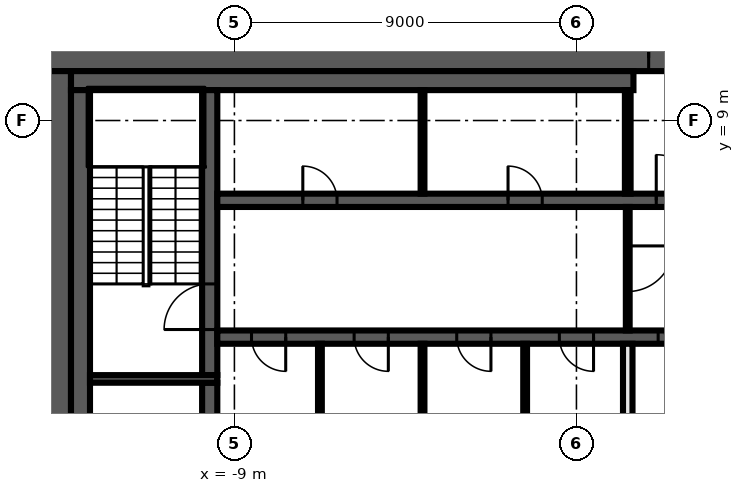
"""IFC4 building model, lengths in metres.
Left out: names, types, materials, properties, quantities, classifications, styles, units other than length and angle.
Written with IfcOpenShell. Run it as: python <this file> out.ifc"""

import sys

from ifc_helpers import new_model, si_unit, direction, frame, frame_2d, origin, place, context, subcontext, project, spatial, rectangle, extrude, element, fill, save


model = new_model("IFC4")
c1 = context("Model", 3, precision=1e-05, world=origin(), true_north=direction((0.0, 1.0)))
c2 = subcontext(c1, "Body", "Model", "MODEL_VIEW")
j1 = project(units=[si_unit("LENGTHUNIT", "METRE"), si_unit("PLANEANGLEUNIT", "RADIAN")], contexts=[c1])
p1 = place(None, origin())
s1 = spatial("IfcSite", under=j1, at=p1, CompositionType="ELEMENT")
p2 = place(p1, origin())
s2 = spatial("IfcBuilding", under=s1, at=p2, CompositionType="ELEMENT")
p3 = place(p2, frame((0.0, 0.0, 274.8)))
s3 = spatial("IfcBuildingStorey", under=s2, at=p3, CompositionType="ELEMENT", Elevation=274.8)
p4 = place(p3, frame((-14.0, 10.65, 0.0), z_axis=(0.0, 0.0, 1.0), x_axis=(1.0, 0.0, 0.0)))
e1 = element("IfcWall", 1, at=p4, inside=s3, PredefinedType="SHEAR", context=c2, shape_type="SweptSolid", body=[
    extrude(rectangle(XDim=28.0, YDim=0.7, at=frame_2d((14.0, 0.0))), origin(), (0.0, 0.0, 1.0), 3.82),
])
p5 = place(p4, frame((15.9, 0.0, 0.0)))
e2 = element("IfcOpeningElement", 2, at=p5, cuts=e1, PredefinedType="OPENING", context=c2, shape_type="SweptSolid", body=[
    extrude(rectangle(XDim=1.6, YDim=2.1, at=frame_2d((0.8, 1.05))), frame((0.0, 0.36, 0.0), z_axis=(0.0, -1.0, 0.0), x_axis=(1.0, 0.0, 0.0)), (0.0, 0.0, 1.0), 0.72),
])
p6 = place(p3, frame((-13.65, -10.3, 0.0), z_axis=(0.0, 0.0, 1.0), x_axis=(0.0, 1.0, 0.0)))
e3 = element("IfcWall", 3, at=p6, inside=s3, PredefinedType="SHEAR", context=c2, shape_type="SweptSolid", body=[
    extrude(rectangle(XDim=20.6, YDim=0.7, at=frame_2d((10.3, 0.0))), origin(), (0.0, 0.0, 1.0), 3.82),
])
p7 = place(p3, frame((-13.3, 10.05, 0.0), z_axis=(0.0, 0.0, 1.0), x_axis=(1.0, 0.0, 0.0)))
e4 = element("IfcWall", 4, at=p7, inside=s3, PredefinedType="SHEAR", context=c2, shape_type="SweptSolid", body=[
    extrude(rectangle(XDim=14.8, YDim=0.5, at=frame_2d((7.4, 0.0))), origin(), (0.0, 0.0, 1.0), 3.82),
])
p8 = place(p3, frame((-13.05, -9.8, 0.0), z_axis=(0.0, 0.0, 1.0), x_axis=(0.0, 1.0, 0.0)))
e5 = element("IfcWall", 5, at=p8, inside=s3, PredefinedType="SHEAR", context=c2, shape_type="SweptSolid", body=[
    extrude(rectangle(XDim=19.6, YDim=0.5, at=frame_2d((9.8, 0.0))), origin(), (0.0, 0.0, 1.0), 3.82),
])
p9 = place(p3, frame((-9.65, -2.1, 0.0), z_axis=(0.0, 0.0, 1.0), x_axis=(0.0, 1.0, 0.0)))
e6 = element("IfcWall", 6, at=p9, inside=s3, PredefinedType="SHEAR", context=c2, shape_type="SweptSolid", body=[
    extrude(rectangle(XDim=4.2, YDim=0.4, at=frame_2d((2.1, 0.0))), origin(), (0.0, 0.0, 1.0), 3.82),
])
p10 = place(p3, frame((-9.65, 2.3, 0.0), z_axis=(0.0, 0.0, 1.0), x_axis=(0.0, 1.0, 0.0)))
e7 = element("IfcWall", 7, at=p10, inside=s3, PredefinedType="SHEAR", context=c2, shape_type="SweptSolid", body=[
    extrude(rectangle(XDim=7.5, YDim=0.4, at=frame_2d((3.75, 0.0))), origin(), (0.0, 0.0, 1.0), 3.82),
])
p11 = place(p10, frame((1.2, 0.0, 0.0)))
e8 = element("IfcOpeningElement", 8, at=p11, cuts=e7, PredefinedType="OPENING", context=c2, shape_type="SweptSolid", body=[
    extrude(rectangle(XDim=1.2, YDim=2.1, at=frame_2d((0.6, 1.05))), frame((0.0, 0.21, 0.0), z_axis=(0.0, -1.0, 0.0), x_axis=(1.0, 0.0, 0.0)), (0.0, 0.0, 1.0), 0.42),
])
p12 = place(p3, frame((-9.45, 2.2, 0.0), z_axis=(0.0, 0.0, 1.0), x_axis=(-1.0, 0.0, 0.0)))
e9 = element("IfcWall", 9, at=p12, inside=s3, PredefinedType="SHEAR", context=c2, shape_type="SweptSolid", body=[
    extrude(rectangle(XDim=3.35, YDim=0.2, at=frame_2d((1.675, 0.0))), origin(), (0.0, 0.0, 1.0), 3.82),
])
p13 = place(p3, frame((-9.45, 6.9, 0.0), z_axis=(0.0, 0.0, 1.0), x_axis=(1.0, 0.0, 0.0)))
e10 = element("IfcWall", 10, at=p13, inside=s3, PredefinedType="SHEAR", context=c2, shape_type="SweptSolid", body=[
    extrude(rectangle(XDim=18.9, YDim=0.35, at=frame_2d((9.45, 0.0))), origin(), (0.0, 0.0, 1.0), 3.82),
])
p14 = place(p13, frame((11.55, 0.0, 0.0)))
e11 = element("IfcOpeningElement", 11, at=p14, cuts=e10, PredefinedType="OPENING", context=c2, shape_type="SweptSolid", body=[
    extrude(rectangle(XDim=1.2, YDim=2.1, at=frame_2d((0.6, 1.05))), frame((0.0, 0.185, 0.0), z_axis=(0.0, -1.0, 0.0), x_axis=(1.0, 0.0, 0.0)), (0.0, 0.0, 1.0), 0.37),
])
p15 = place(p13, frame((14.3, 0.0, 0.0)))
e12 = element("IfcOpeningElement", 12, at=p15, cuts=e10, PredefinedType="OPENING", context=c2, shape_type="SweptSolid", body=[
    extrude(rectangle(XDim=1.1, YDim=2.1, at=frame_2d((0.55, 1.05))), frame((0.0, 0.185, 0.0), z_axis=(0.0, -1.0, 0.0), x_axis=(1.0, 0.0, 0.0)), (0.0, 0.0, 1.0), 0.37),
])
p16 = place(p13, frame((17.0, 0.0, 0.0)))
e13 = element("IfcOpeningElement", 13, at=p16, cuts=e10, PredefinedType="OPENING", context=c2, shape_type="SweptSolid", body=[
    extrude(rectangle(XDim=1.1, YDim=2.1, at=frame_2d((0.55, 1.05))), frame((0.0, 0.185, 0.0), z_axis=(0.0, -1.0, 0.0), x_axis=(1.0, 0.0, 0.0)), (0.0, 0.0, 1.0), 0.37),
])
p17 = place(p13, frame((2.25, 0.0, 0.0)))
e14 = element("IfcOpeningElement", 14, at=p17, cuts=e10, PredefinedType="OPENING", context=c2, shape_type="SweptSolid", body=[
    extrude(rectangle(XDim=0.9, YDim=2.1, at=frame_2d((0.45, 1.05))), frame((0.0, 0.185, 0.0), z_axis=(0.0, -1.0, 0.0), x_axis=(1.0, 0.0, 0.0)), (0.0, 0.0, 1.0), 0.37),
])
p18 = place(p13, frame((7.65, 0.0, 0.0)))
e15 = element("IfcOpeningElement", 15, at=p18, cuts=e10, PredefinedType="OPENING", context=c2, shape_type="SweptSolid", body=[
    extrude(rectangle(XDim=0.9, YDim=2.1, at=frame_2d((0.45, 1.05))), frame((0.0, 0.185, 0.0), z_axis=(0.0, -1.0, 0.0), x_axis=(1.0, 0.0, 0.0)), (0.0, 0.0, 1.0), 0.37),
])
p19 = place(p3, frame((9.45, 3.3, 0.0), z_axis=(0.0, 0.0, 1.0), x_axis=(-1.0, 0.0, 0.0)))
e16 = element("IfcWall", 16, at=p19, inside=s3, PredefinedType="SHEAR", context=c2, shape_type="SweptSolid", body=[
    extrude(rectangle(XDim=18.9, YDim=0.35, at=frame_2d((9.45, 0.0))), origin(), (0.0, 0.0, 1.0), 3.82),
])
p20 = place(p19, frame((6.2, 0.0, 0.0)))
e17 = element("IfcOpeningElement", 17, at=p20, cuts=e16, PredefinedType="OPENING", context=c2, shape_type="SweptSolid", body=[
    extrude(rectangle(XDim=1.1, YDim=2.1, at=frame_2d((0.55, 1.05))), frame((0.0, 0.185, 0.0), z_axis=(0.0, -1.0, 0.0), x_axis=(1.0, 0.0, 0.0)), (0.0, 0.0, 1.0), 0.37),
])
p21 = place(p19, frame((3.5, 0.0, 0.0)))
e18 = element("IfcOpeningElement", 18, at=p21, cuts=e16, PredefinedType="OPENING", context=c2, shape_type="SweptSolid", body=[
    extrude(rectangle(XDim=1.1, YDim=2.1, at=frame_2d((0.55, 1.05))), frame((0.0, 0.185, 0.0), z_axis=(0.0, -1.0, 0.0), x_axis=(1.0, 0.0, 0.0)), (0.0, 0.0, 1.0), 0.37),
])
p22 = place(p19, frame((0.9, 0.0, 0.0)))
e19 = element("IfcOpeningElement", 19, at=p22, cuts=e16, PredefinedType="OPENING", context=c2, shape_type="SweptSolid", body=[
    extrude(rectangle(XDim=0.9, YDim=2.1, at=frame_2d((0.45, 1.05))), frame((0.0, 0.185, 0.0), z_axis=(0.0, -1.0, 0.0), x_axis=(1.0, 0.0, 0.0)), (0.0, 0.0, 1.0), 0.37),
])
p23 = place(p19, frame((17.1, 0.0, 0.0)))
e20 = element("IfcOpeningElement", 20, at=p23, cuts=e16, PredefinedType="OPENING", context=c2, shape_type="SweptSolid", body=[
    extrude(rectangle(XDim=0.9, YDim=2.1, at=frame_2d((0.45, 1.05))), frame((0.0, 0.185, 0.0), z_axis=(0.0, -1.0, 0.0), x_axis=(1.0, 0.0, 0.0)), (0.0, 0.0, 1.0), 0.37),
])
p24 = place(p19, frame((14.4, 0.0, 0.0)))
e21 = element("IfcOpeningElement", 21, at=p24, cuts=e16, PredefinedType="OPENING", context=c2, shape_type="SweptSolid", body=[
    extrude(rectangle(XDim=0.9, YDim=2.1, at=frame_2d((0.45, 1.05))), frame((0.0, 0.185, 0.0), z_axis=(0.0, -1.0, 0.0), x_axis=(1.0, 0.0, 0.0)), (0.0, 0.0, 1.0), 0.37),
])
p25 = place(p19, frame((11.7, 0.0, 0.0)))
e22 = element("IfcOpeningElement", 22, at=p25, cuts=e16, PredefinedType="OPENING", context=c2, shape_type="SweptSolid", body=[
    extrude(rectangle(XDim=0.9, YDim=2.1, at=frame_2d((0.45, 1.05))), frame((0.0, 0.185, 0.0), z_axis=(0.0, -1.0, 0.0), x_axis=(1.0, 0.0, 0.0)), (0.0, 0.0, 1.0), 0.37),
])
p26 = place(p19, frame((9.0, 0.0, 0.0)))
e23 = element("IfcOpeningElement", 23, at=p26, cuts=e16, PredefinedType="OPENING", context=c2, shape_type="SweptSolid", body=[
    extrude(rectangle(XDim=0.9, YDim=2.1, at=frame_2d((0.45, 1.05))), frame((0.0, 0.185, 0.0), z_axis=(0.0, -1.0, 0.0), x_axis=(1.0, 0.0, 0.0)), (0.0, 0.0, 1.0), 0.37),
])
p27 = place(p3, frame((1.35, 7.075, 0.0), z_axis=(0.0, 0.0, 1.0), x_axis=(0.0, 1.0, 0.0)))
e24 = element("IfcWall", 24, at=p27, inside=s3, PredefinedType="PARTITIONING", context=c2, shape_type="SweptSolid", body=[
    extrude(rectangle(XDim=2.725, YDim=0.15, at=frame_2d((1.363, 0.0))), origin(), (0.0, 0.0, 1.0), 3.82),
])
p28 = place(p3, frame((1.35, 6.725, 0.0), z_axis=(0.0, 0.0, 1.0), x_axis=(0.0, -1.0, 0.0)))
e25 = element("IfcWall", 25, at=p28, inside=s3, PredefinedType="PARTITIONING", context=c2, shape_type="SweptSolid", body=[
    extrude(rectangle(XDim=3.25, YDim=0.1, at=frame_2d((1.625, 0.0))), origin(), (0.0, 0.0, 1.0), 3.82),
])
p29 = place(p28, frame((1.025, 0.0, 0.0)))
e26 = element("IfcOpeningElement", 26, at=p29, cuts=e25, PredefinedType="OPENING", context=c2, shape_type="SweptSolid", body=[
    extrude(rectangle(XDim=1.2, YDim=2.1, at=frame_2d((0.6, 1.05))), frame((0.0, 0.06, 0.0), z_axis=(0.0, -1.0, 0.0), x_axis=(1.0, 0.0, 0.0)), (0.0, 0.0, 1.0), 0.12),
])
p30 = place(p3, frame((1.35, 0.4, 0.0), z_axis=(0.0, 0.0, 1.0), x_axis=(0.0, 1.0, 0.0)))
e27 = element("IfcWall", 27, at=p30, inside=s3, PredefinedType="SOLIDWALL", context=c2, shape_type="SweptSolid", body=[
    extrude(rectangle(XDim=2.725, YDim=0.25, at=frame_2d((1.363, 0.0))), origin(), (0.0, 0.0, 1.0), 3.82),
])
for number, where, z_axis, x_axis in (
    (28, (-1.35, 0.4, 0.0), (0.0, 0.0, 1.0), (0.0, 1.0, 0.0)),
    (29, (-4.05, 0.4, 0.0), (0.0, 0.0, 1.0), (0.0, 1.0, 0.0)),
    (30, (-4.05, 7.075, 0.0), (0.0, 0.0, 1.0), (0.0, 1.0, 0.0)),
    (31, (-6.75, 0.4, 0.0), (0.0, 0.0, 1.0), (0.0, 1.0, 0.0)),
):
    element("IfcWall", number, at=place(p3, frame(where, z_axis=z_axis, x_axis=x_axis)), inside=s3, PredefinedType="PARTITIONING", context=c2, shape_type="SweptSolid", body=[
        extrude(rectangle(XDim=2.725, YDim=0.1, at=frame_2d((1.363, 0.0))), origin(), (0.0, 0.0, 1.0), 3.82),
    ])
p31 = place(p5, origin())
e32 = element("IfcDoor", 32, at=p31, inside=s3, OperationType="DOUBLE_DOOR_SINGLE_SWING", PredefinedType="DOOR", context=c2, shape_type="SweptSolid", body=[
    extrude(rectangle(XDim=1.6, YDim=2.1, at=frame_2d((0.8, 1.05))), frame((0.0, 0.025, 0.0), z_axis=(0.0, -1.0, 0.0), x_axis=(1.0, 0.0, 0.0)), (0.0, 0.0, 1.0), 0.05),
])
fill(e2, e32)
p32 = place(p14, origin())
e33 = element("IfcDoor", 33, at=p32, inside=s3, OperationType="SINGLE_SWING_LEFT", PredefinedType="DOOR", context=c2, shape_type="SweptSolid", body=[
    extrude(rectangle(XDim=1.2, YDim=2.1, at=frame_2d((0.6, 1.05))), frame((0.0, 0.025, 0.0), z_axis=(0.0, -1.0, 0.0), x_axis=(1.0, 0.0, 0.0)), (0.0, 0.0, 1.0), 0.05),
])
fill(e11, e33)
p33 = place(p20, origin())
e34 = element("IfcDoor", 34, at=p33, inside=s3, OperationType="DOUBLE_DOOR_SLIDING", PredefinedType="DOOR", context=c2, shape_type="SweptSolid", body=[
    extrude(rectangle(XDim=1.1, YDim=2.1, at=frame_2d((0.55, 1.05))), frame((0.0, 0.025, 0.0), z_axis=(0.0, -1.0, 0.0), x_axis=(1.0, 0.0, 0.0)), (0.0, 0.0, 1.0), 0.05),
])
fill(e17, e34)
p34 = place(p17, origin())
e35 = element("IfcDoor", 35, at=p34, inside=s3, OperationType="SINGLE_SWING_RIGHT", PredefinedType="DOOR", context=c2, shape_type="SweptSolid", body=[
    extrude(rectangle(XDim=0.9, YDim=2.1, at=frame_2d((0.45, 1.05))), frame((0.0, 0.025, 0.0), z_axis=(0.0, -1.0, 0.0), x_axis=(1.0, 0.0, 0.0)), (0.0, 0.0, 1.0), 0.05),
])
fill(e14, e35)
p35 = place(p18, origin())
e36 = element("IfcDoor", 36, at=p35, inside=s3, OperationType="SINGLE_SWING_LEFT", PredefinedType="DOOR", context=c2, shape_type="SweptSolid", body=[
    extrude(rectangle(XDim=0.9, YDim=2.1, at=frame_2d((0.45, 1.05))), frame((0.0, 0.025, 0.0), z_axis=(0.0, -1.0, 0.0), x_axis=(1.0, 0.0, 0.0)), (0.0, 0.0, 1.0), 0.05),
])
fill(e15, e36)
p36 = place(p23, origin())
e37 = element("IfcDoor", 37, at=p36, inside=s3, OperationType="SINGLE_SWING_RIGHT", PredefinedType="DOOR", context=c2, shape_type="SweptSolid", body=[
    extrude(rectangle(XDim=0.9, YDim=2.1, at=frame_2d((0.45, 1.05))), frame((0.0, 0.025, 0.0), z_axis=(0.0, -1.0, 0.0), x_axis=(1.0, 0.0, 0.0)), (0.0, 0.0, 1.0), 0.05),
])
fill(e20, e37)
p37 = place(p24, origin())
e38 = element("IfcDoor", 38, at=p37, inside=s3, OperationType="SINGLE_SWING_LEFT", PredefinedType="DOOR", context=c2, shape_type="SweptSolid", body=[
    extrude(rectangle(XDim=0.9, YDim=2.1, at=frame_2d((0.45, 1.05))), frame((0.0, 0.025, 0.0), z_axis=(0.0, -1.0, 0.0), x_axis=(1.0, 0.0, 0.0)), (0.0, 0.0, 1.0), 0.05),
])
fill(e21, e38)
p38 = place(p25, origin())
e39 = element("IfcDoor", 39, at=p38, inside=s3, OperationType="SINGLE_SWING_RIGHT", PredefinedType="DOOR", context=c2, shape_type="SweptSolid", body=[
    extrude(rectangle(XDim=0.9, YDim=2.1, at=frame_2d((0.45, 1.05))), frame((0.0, 0.025, 0.0), z_axis=(0.0, -1.0, 0.0), x_axis=(1.0, 0.0, 0.0)), (0.0, 0.0, 1.0), 0.05),
])
fill(e22, e39)
p39 = place(p26, origin())
e40 = element("IfcDoor", 40, at=p39, inside=s3, OperationType="SINGLE_SWING_LEFT", PredefinedType="DOOR", context=c2, shape_type="SweptSolid", body=[
    extrude(rectangle(XDim=0.9, YDim=2.1, at=frame_2d((0.45, 1.05))), frame((0.0, 0.025, 0.0), z_axis=(0.0, -1.0, 0.0), x_axis=(1.0, 0.0, 0.0)), (0.0, 0.0, 1.0), 0.05),
])
fill(e23, e40)
p40 = place(p11, origin())
e41 = element("IfcDoor", 41, at=p40, inside=s3, OperationType="SINGLE_SWING_RIGHT", PredefinedType="DOOR", context=c2, shape_type="SweptSolid", body=[
    extrude(rectangle(XDim=1.2, YDim=2.1, at=frame_2d((0.6, 1.05))), frame((0.0, 0.025, 0.0), z_axis=(0.0, -1.0, 0.0), x_axis=(1.0, 0.0, 0.0)), (0.0, 0.0, 1.0), 0.05),
])
fill(e8, e41)
p41 = place(p29, origin())
e42 = element("IfcDoor", 42, at=p41, inside=s3, OperationType="SINGLE_SWING_LEFT", PredefinedType="DOOR", context=c2, shape_type="SweptSolid", body=[
    extrude(rectangle(XDim=1.2, YDim=2.1, at=frame_2d((0.6, 1.05))), frame((0.0, 0.025, 0.0), z_axis=(0.0, -1.0, 0.0), x_axis=(1.0, 0.0, 0.0)), (0.0, 0.0, 1.0), 0.05),
])
fill(e26, e42)
save(model, sys.argv[1])
